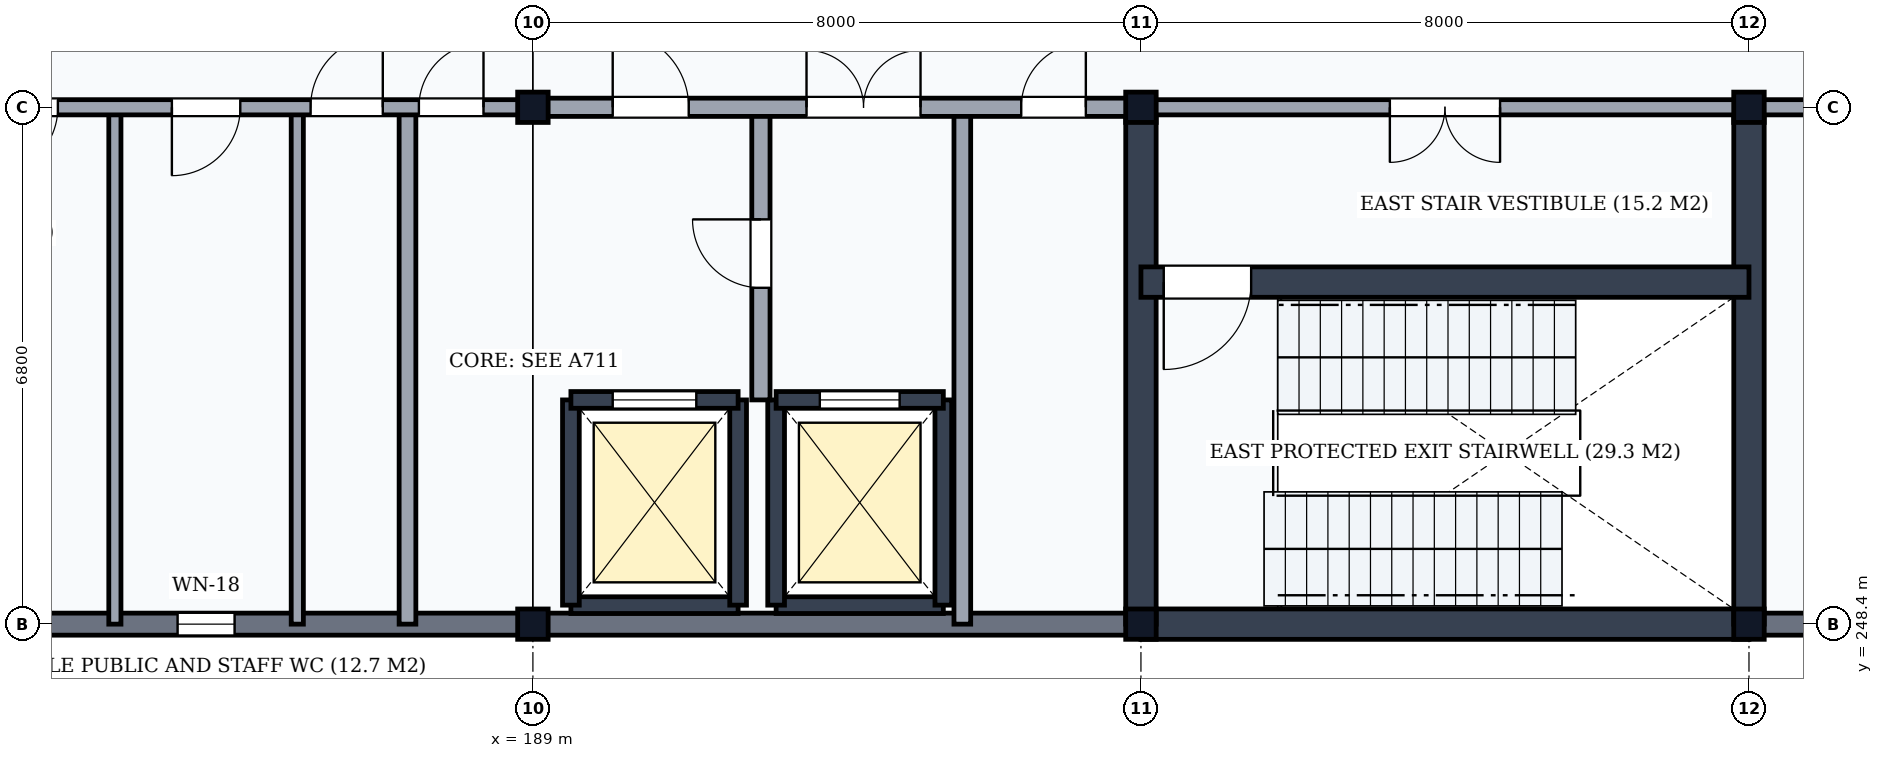
"""IFC4 building model, lengths in metres.
Left out: names, types, materials, properties, quantities, classifications, styles, units other than length and angle.
Written with IfcOpenShell. Run it as: python <this file> out.ifc"""

import sys

from ifc_helpers import new_model, si_unit, direction, frame, frame_2d, origin, origin_2d, place, context, subcontext, project, spatial, rectangle, i_section, extrude, element, fill, save


model = new_model("IFC4")
c1 = context("Model", 3, precision=1e-05, world=origin(), true_north=direction((0.0, 1.0)))
c2 = subcontext(c1, "Body", "Model", "MODEL_VIEW")
j1 = project(units=[si_unit("LENGTHUNIT", "METRE"), si_unit("PLANEANGLEUNIT", "RADIAN")], contexts=[c1])
p1 = place(None, origin())
s1 = spatial("IfcSite", under=j1, at=p1, CompositionType="ELEMENT")
p2 = place(p1, origin())
s2 = spatial("IfcBuilding", under=s1, at=p2, CompositionType="ELEMENT")
p3 = place(p2, frame((0.0, 0.0, 10.5)))
s3 = spatial("IfcBuildingStorey", under=s2, at=p3, CompositionType="ELEMENT", Elevation=10.5)
for number, where, z_axis, x_axis in (
    (1, (189.0, 248.4, 0.0), (0.0, 0.0, 1.0), (1.0, 0.0, 0.0)),
    (2, (189.0, 255.2, 0.0), (0.0, 0.0, 1.0), (1.0, 0.0, 0.0)),
    (3, (197.0, 248.4, 0.0), (0.0, 0.0, 1.0), (1.0, 0.0, 0.0)),
    (4, (197.0, 255.2, 0.0), (0.0, 0.0, 1.0), (1.0, 0.0, 0.0)),
    (5, (205.0, 248.4, 0.0), (0.0, 0.0, 1.0), (1.0, 0.0, 0.0)),
    (6, (205.0, 255.2, 0.0), (0.0, 0.0, 1.0), (1.0, 0.0, 0.0)),
):
    element("IfcColumn", number, at=place(p3, frame(where, z_axis=z_axis, x_axis=x_axis)), inside=s3, PredefinedType="COLUMN", context=c2, shape_type="SweptSolid", body=[
        extrude(i_section(OverallWidth=0.401, OverallDepth=0.399, WebThickness=0.025, FlangeThickness=0.04, FilletRadius=0.015, at=origin_2d()), origin(), (0.0, 0.0, 1.0), 5.1),
    ])
p4 = place(p3, frame((181.006, 248.4, 0.0), z_axis=(0.0, 0.0, 1.0), x_axis=(1.0, 0.0, 0.0)))
e7 = element("IfcWall", 7, at=p4, inside=s3, PredefinedType="SOLIDWALL", context=c2, shape_type="SweptSolid", body=[
    extrude(rectangle(XDim=7.988, YDim=0.29, at=frame_2d((3.994, 0.0))), origin(), (0.0, 0.0, 1.0), 4.528),
])
p5 = place(p4, frame((3.319, 0.0, 0.85)))
e8 = element("IfcOpeningElement", 8, at=p5, cuts=e7, PredefinedType="OPENING", context=c2, shape_type="SweptSolid", body=[
    extrude(rectangle(XDim=0.75, YDim=2.0, at=frame_2d((0.375, 1.0))), frame((0.0, 0.16, 0.0), z_axis=(0.0, -1.0, 0.0), x_axis=(1.0, 0.0, 0.0)), (0.0, 0.0, 1.0), 0.32),
])
p6 = place(p3, frame((189.006, 248.4, 0.0), z_axis=(0.0, 0.0, 1.0), x_axis=(1.0, 0.0, 0.0)))
e9 = element("IfcWall", 9, at=p6, inside=s3, PredefinedType="SOLIDWALL", context=c2, shape_type="SweptSolid", body=[
    extrude(rectangle(XDim=7.988, YDim=0.29, at=frame_2d((3.994, 0.0))), origin(), (0.0, 0.0, 1.0), 4.528),
])
p7 = place(p3, frame((205.006, 248.4, 0.0), z_axis=(0.0, 0.0, 1.0), x_axis=(1.0, 0.0, 0.0)))
e10 = element("IfcWall", 10, at=p7, inside=s3, PredefinedType="SOLIDWALL", context=c2, shape_type="SweptSolid", body=[
    extrude(rectangle(XDim=7.988, YDim=0.29, at=frame_2d((3.994, 0.0))), origin(), (0.0, 0.0, 1.0), 4.528),
])
p8 = place(p7, frame((3.319, 0.0, 0.95)))
e11 = element("IfcOpeningElement", 11, at=p8, cuts=e10, PredefinedType="OPENING", context=c2, shape_type="SweptSolid", body=[
    extrude(rectangle(XDim=1.35, YDim=1.8, at=frame_2d((0.675, 0.9))), frame((0.0, 0.16, 0.0), z_axis=(0.0, -1.0, 0.0), x_axis=(1.0, 0.0, 0.0)), (0.0, 0.0, 1.0), 0.32),
])
p9 = place(p3, frame((197.0, 248.4, 0.0), z_axis=(0.0, 0.0, 1.0), x_axis=(1.0, 0.0, 0.0)))
e12 = element("IfcWall", 12, at=p9, inside=s3, PredefinedType="SHEAR", context=c2, shape_type="SweptSolid", body=[
    extrude(rectangle(XDim=8.0, YDim=0.4, at=frame_2d((4.0, 0.0))), origin(), (0.0, 0.0, 1.0), 4.84),
])
for number, where, z_axis, x_axis in (
    (13, (197.0, 248.4, 0.0), (0.0, 0.0, 1.0), (0.0, 1.0, 0.0)),
    (14, (205.0, 248.4, 0.0), (0.0, 0.0, 1.0), (0.0, 1.0, 0.0)),
):
    element("IfcWall", number, at=place(p3, frame(where, z_axis=z_axis, x_axis=x_axis)), inside=s3, PredefinedType="SHEAR", context=c2, shape_type="SweptSolid", body=[
        extrude(rectangle(XDim=6.8, YDim=0.4, at=frame_2d((3.4, 0.0))), origin(), (0.0, 0.0, 1.0), 4.84),
    ])
p10 = place(p3, frame((197.0, 252.9, 0.0), z_axis=(0.0, 0.0, 1.0), x_axis=(1.0, 0.0, 0.0)))
e15 = element("IfcWall", 15, at=p10, inside=s3, PredefinedType="SHEAR", context=c2, shape_type="SweptSolid", body=[
    extrude(rectangle(XDim=8.0, YDim=0.4, at=frame_2d((4.0, 0.0))), origin(), (0.0, 0.0, 1.0), 4.84),
])
p11 = place(p10, frame((0.3, 0.0, 0.0)))
e16 = element("IfcOpeningElement", 16, at=p11, cuts=e15, PredefinedType="OPENING", context=c2, shape_type="SweptSolid", body=[
    extrude(rectangle(XDim=1.15, YDim=2.15, at=frame_2d((0.575, 1.075))), frame((0.0, 0.215, 0.0), z_axis=(0.0, -1.0, 0.0), x_axis=(1.0, 0.0, 0.0)), (0.0, 0.0, 1.0), 0.43),
])
p12 = place(p3, frame((197.0, 255.2, 0.0), z_axis=(0.0, 0.0, 1.0), x_axis=(1.0, 0.0, 0.0)))
e17 = element("IfcWall", 17, at=p12, inside=s3, PredefinedType="PARTITIONING", context=c2, shape_type="SweptSolid", body=[
    extrude(rectangle(XDim=8.0, YDim=0.2, at=frame_2d((4.0, 0.0))), origin(), (0.0, 0.0, 1.0), 4.338),
])
p13 = place(p12, frame((3.275, 0.0, 0.0)))
e18 = element("IfcOpeningElement", 18, at=p13, cuts=e17, PredefinedType="OPENING", context=c2, shape_type="SweptSolid", body=[
    extrude(rectangle(XDim=1.45, YDim=2.2, at=frame_2d((0.725, 1.1))), frame((0.0, 0.115, 0.0), z_axis=(0.0, -1.0, 0.0), x_axis=(1.0, 0.0, 0.0)), (0.0, 0.0, 1.0), 0.23),
])
p14 = place(p3, frame((189.5, 248.65, 0.0), z_axis=(0.0, 0.0, 1.0), x_axis=(1.0, 0.0, 0.0)))
e19 = element("IfcWall", 19, at=p14, inside=s3, PredefinedType="SHEAR", context=c2, shape_type="SweptSolid", body=[
    extrude(rectangle(XDim=2.2, YDim=0.22, at=frame_2d((1.1, 0.0))), origin(), (0.0, 0.0, 1.0), 4.84),
])
for number, where, z_axis, x_axis in (
    (20, (189.5, 248.65, 0.0), (0.0, 0.0, 1.0), (0.0, 1.0, 0.0)),
    (21, (191.7, 248.65, 0.0), (0.0, 0.0, 1.0), (0.0, 1.0, 0.0)),
):
    element("IfcWall", number, at=place(p3, frame(where, z_axis=z_axis, x_axis=x_axis)), inside=s3, PredefinedType="SHEAR", context=c2, shape_type="SweptSolid", body=[
        extrude(rectangle(XDim=2.7, YDim=0.22, at=frame_2d((1.35, 0.0))), origin(), (0.0, 0.0, 1.0), 4.84),
    ])
p15 = place(p3, frame((189.5, 251.35, 0.0), z_axis=(0.0, 0.0, 1.0), x_axis=(1.0, 0.0, 0.0)))
e22 = element("IfcWall", 22, at=p15, inside=s3, PredefinedType="SHEAR", context=c2, shape_type="SweptSolid", body=[
    extrude(rectangle(XDim=2.2, YDim=0.22, at=frame_2d((1.1, 0.0))), origin(), (0.0, 0.0, 1.0), 4.84),
])
p16 = place(p15, frame((0.55, 0.0, 0.0)))
e23 = element("IfcOpeningElement", 23, at=p16, cuts=e22, PredefinedType="OPENING", context=c2, shape_type="SweptSolid", body=[
    extrude(rectangle(XDim=1.1, YDim=2.15, at=frame_2d((0.55, 1.075))), frame((0.0, 0.125, 0.0), z_axis=(0.0, -1.0, 0.0), x_axis=(1.0, 0.0, 0.0)), (0.0, 0.0, 1.0), 0.25),
])
p17 = place(p3, frame((192.2, 248.65, 0.0), z_axis=(0.0, 0.0, 1.0), x_axis=(1.0, 0.0, 0.0)))
e24 = element("IfcWall", 24, at=p17, inside=s3, PredefinedType="SHEAR", context=c2, shape_type="SweptSolid", body=[
    extrude(rectangle(XDim=2.2, YDim=0.22, at=frame_2d((1.1, 0.0))), origin(), (0.0, 0.0, 1.0), 4.84),
])
for number, where, z_axis, x_axis in (
    (25, (192.2, 248.65, 0.0), (0.0, 0.0, 1.0), (0.0, 1.0, 0.0)),
    (26, (194.4, 248.65, 0.0), (0.0, 0.0, 1.0), (0.0, 1.0, 0.0)),
):
    element("IfcWall", number, at=place(p3, frame(where, z_axis=z_axis, x_axis=x_axis)), inside=s3, PredefinedType="SHEAR", context=c2, shape_type="SweptSolid", body=[
        extrude(rectangle(XDim=2.7, YDim=0.22, at=frame_2d((1.35, 0.0))), origin(), (0.0, 0.0, 1.0), 4.84),
    ])
p18 = place(p3, frame((192.2, 251.35, 0.0), z_axis=(0.0, 0.0, 1.0), x_axis=(1.0, 0.0, 0.0)))
e27 = element("IfcWall", 27, at=p18, inside=s3, PredefinedType="SHEAR", context=c2, shape_type="SweptSolid", body=[
    extrude(rectangle(XDim=2.2, YDim=0.22, at=frame_2d((1.1, 0.0))), origin(), (0.0, 0.0, 1.0), 4.84),
])
p19 = place(p18, frame((0.575, 0.0, 0.0)))
e28 = element("IfcOpeningElement", 28, at=p19, cuts=e27, PredefinedType="OPENING", context=c2, shape_type="SweptSolid", body=[
    extrude(rectangle(XDim=1.05, YDim=2.15, at=frame_2d((0.525, 1.075))), frame((0.0, 0.125, 0.0), z_axis=(0.0, -1.0, 0.0), x_axis=(1.0, 0.0, 0.0)), (0.0, 0.0, 1.0), 0.25),
])
p20 = place(p3, frame((192.0, 251.35, 0.0), z_axis=(0.0, 0.0, 1.0), x_axis=(0.0, 1.0, 0.0)))
e29 = element("IfcWall", 29, at=p20, inside=s3, PredefinedType="PARTITIONING", context=c2, shape_type="SweptSolid", body=[
    extrude(rectangle(XDim=3.85, YDim=0.24, at=frame_2d((1.925, 0.0))), origin(), (0.0, 0.0, 1.0), 4.84),
])
p21 = place(p20, frame((1.475, 0.0, 0.0)))
e30 = element("IfcOpeningElement", 30, at=p21, cuts=e29, PredefinedType="OPENING", context=c2, shape_type="SweptSolid", body=[
    extrude(rectangle(XDim=0.9, YDim=2.1, at=frame_2d((0.45, 1.05))), frame((0.0, 0.135, 0.0), z_axis=(0.0, -1.0, 0.0), x_axis=(1.0, 0.0, 0.0)), (0.0, 0.0, 1.0), 0.27),
])
p22 = place(p3, frame((194.65, 248.4, 0.0), z_axis=(0.0, 0.0, 1.0), x_axis=(0.0, 1.0, 0.0)))
e31 = element("IfcWall", 31, at=p22, inside=s3, PredefinedType="PARTITIONING", context=c2, shape_type="SweptSolid", body=[
    extrude(rectangle(XDim=6.8, YDim=0.22, at=frame_2d((3.4, 0.0))), origin(), (0.0, 0.0, 1.0), 4.84),
])
for number, where, z_axis, x_axis in (
    (32, (183.5, 248.4, 0.0), (0.0, 0.0, 1.0), (0.0, 1.0, 0.0)),
    (33, (185.9, 248.4, 0.0), (0.0, 0.0, 1.0), (0.0, 1.0, 0.0)),
):
    element("IfcWall", number, at=place(p3, frame(where, z_axis=z_axis, x_axis=x_axis)), inside=s3, PredefinedType="PARTITIONING", context=c2, shape_type="SweptSolid", body=[
        extrude(rectangle(XDim=6.8, YDim=0.16, at=frame_2d((3.4, 0.0))), origin(), (0.0, 0.0, 1.0), 4.84),
    ])
p23 = place(p3, frame((187.35, 248.4, 0.0), z_axis=(0.0, 0.0, 1.0), x_axis=(0.0, 1.0, 0.0)))
e34 = element("IfcWall", 34, at=p23, inside=s3, PredefinedType="PARTITIONING", context=c2, shape_type="SweptSolid", body=[
    extrude(rectangle(XDim=6.8, YDim=0.22, at=frame_2d((3.4, 0.0))), origin(), (0.0, 0.0, 1.0), 4.84),
])
p24 = place(p3, frame((181.0, 255.2, 0.0), z_axis=(0.0, 0.0, 1.0), x_axis=(1.0, 0.0, 0.0)))
e35 = element("IfcWall", 35, at=p24, inside=s3, PredefinedType="PARTITIONING", context=c2, shape_type="SweptSolid", body=[
    extrude(rectangle(XDim=8.0, YDim=0.2, at=frame_2d((4.0, 0.0))), origin(), (0.0, 0.0, 1.0), 4.338),
])
p25 = place(p24, frame((0.85, 0.0, 0.0)))
e36 = element("IfcOpeningElement", 36, at=p25, cuts=e35, PredefinedType="OPENING", context=c2, shape_type="SweptSolid", body=[
    extrude(rectangle(XDim=0.9, YDim=2.1, at=frame_2d((0.45, 1.05))), frame((0.0, 0.115, 0.0), z_axis=(0.0, -1.0, 0.0), x_axis=(1.0, 0.0, 0.0)), (0.0, 0.0, 1.0), 0.23),
])
p26 = place(p24, frame((3.25, 0.0, 0.0)))
e37 = element("IfcOpeningElement", 37, at=p26, cuts=e35, PredefinedType="OPENING", context=c2, shape_type="SweptSolid", body=[
    extrude(rectangle(XDim=0.9, YDim=2.1, at=frame_2d((0.45, 1.05))), frame((0.0, 0.115, 0.0), z_axis=(0.0, -1.0, 0.0), x_axis=(1.0, 0.0, 0.0)), (0.0, 0.0, 1.0), 0.23),
])
p27 = place(p24, frame((5.075, 0.0, 0.0)))
e38 = element("IfcOpeningElement", 38, at=p27, cuts=e35, PredefinedType="OPENING", context=c2, shape_type="SweptSolid", body=[
    extrude(rectangle(XDim=0.95, YDim=2.1, at=frame_2d((0.475, 1.05))), frame((0.0, 0.115, 0.0), z_axis=(0.0, -1.0, 0.0), x_axis=(1.0, 0.0, 0.0)), (0.0, 0.0, 1.0), 0.23),
])
p28 = place(p24, frame((6.5, 0.0, 0.0)))
e39 = element("IfcOpeningElement", 39, at=p28, cuts=e35, PredefinedType="OPENING", context=c2, shape_type="SweptSolid", body=[
    extrude(rectangle(XDim=0.85, YDim=2.1, at=frame_2d((0.425, 1.05))), frame((0.0, 0.115, 0.0), z_axis=(0.0, -1.0, 0.0), x_axis=(1.0, 0.0, 0.0)), (0.0, 0.0, 1.0), 0.23),
])
p29 = place(p3, frame((189.0, 255.2, 0.0), z_axis=(0.0, 0.0, 1.0), x_axis=(1.0, 0.0, 0.0)))
e40 = element("IfcWall", 40, at=p29, inside=s3, PredefinedType="PARTITIONING", context=c2, shape_type="SweptSolid", body=[
    extrude(rectangle(XDim=8.0, YDim=0.24, at=frame_2d((4.0, 0.0))), origin(), (0.0, 0.0, 1.0), 4.338),
])
p30 = place(p29, frame((1.05, 0.0, 0.0)))
e41 = element("IfcOpeningElement", 41, at=p30, cuts=e40, PredefinedType="OPENING", context=c2, shape_type="SweptSolid", body=[
    extrude(rectangle(XDim=1.0, YDim=2.1, at=frame_2d((0.5, 1.05))), frame((0.0, 0.135, 0.0), z_axis=(0.0, -1.0, 0.0), x_axis=(1.0, 0.0, 0.0)), (0.0, 0.0, 1.0), 0.27),
])
p31 = place(p29, frame((3.6, 0.0, 0.0)))
e42 = element("IfcOpeningElement", 42, at=p31, cuts=e40, PredefinedType="OPENING", context=c2, shape_type="SweptSolid", body=[
    extrude(rectangle(XDim=1.5, YDim=2.25, at=frame_2d((0.75, 1.125))), frame((0.0, 0.135, 0.0), z_axis=(0.0, -1.0, 0.0), x_axis=(1.0, 0.0, 0.0)), (0.0, 0.0, 1.0), 0.27),
])
p32 = place(p29, frame((6.425, 0.0, 0.0)))
e43 = element("IfcOpeningElement", 43, at=p32, cuts=e40, PredefinedType="OPENING", context=c2, shape_type="SweptSolid", body=[
    extrude(rectangle(XDim=0.85, YDim=2.1, at=frame_2d((0.425, 1.05))), frame((0.0, 0.135, 0.0), z_axis=(0.0, -1.0, 0.0), x_axis=(1.0, 0.0, 0.0)), (0.0, 0.0, 1.0), 0.27),
])
p33 = place(p3, frame((205.0, 255.2, 0.0), z_axis=(0.0, 0.0, 1.0), x_axis=(1.0, 0.0, 0.0)))
e44 = element("IfcWall", 44, at=p33, inside=s3, PredefinedType="PARTITIONING", context=c2, shape_type="SweptSolid", body=[
    extrude(rectangle(XDim=24.0, YDim=0.2, at=frame_2d((12.0, 0.0))), origin(), (0.0, 0.0, 1.0), 4.338),
])
p34 = place(p33, frame((5.5, 0.0, 0.0)))
e45 = element("IfcOpeningElement", 45, at=p34, cuts=e44, PredefinedType="OPENING", context=c2, shape_type="SweptSolid", body=[
    extrude(rectangle(XDim=1.0, YDim=2.1, at=frame_2d((0.5, 1.05))), frame((0.0, 0.115, 0.0), z_axis=(0.0, -1.0, 0.0), x_axis=(1.0, 0.0, 0.0)), (0.0, 0.0, 1.0), 0.23),
])
p35 = place(p33, frame((17.5, 0.0, 0.0)))
e46 = element("IfcOpeningElement", 46, at=p35, cuts=e44, PredefinedType="OPENING", context=c2, shape_type="SweptSolid", body=[
    extrude(rectangle(XDim=1.0, YDim=2.1, at=frame_2d((0.5, 1.05))), frame((0.0, 0.115, 0.0), z_axis=(0.0, -1.0, 0.0), x_axis=(1.0, 0.0, 0.0)), (0.0, 0.0, 1.0), 0.23),
])
p36 = place(p5, origin())
e47 = element("IfcWindow", 47, at=p36, inside=s3, PartitioningType="SINGLE_PANEL", PredefinedType="WINDOW", context=c2, shape_type="SweptSolid", body=[
    extrude(rectangle(XDim=0.75, YDim=2.0, at=frame_2d((0.375, 1.0))), frame((0.0, 0.03, 0.0), z_axis=(0.0, -1.0, 0.0), x_axis=(1.0, 0.0, 0.0)), (0.0, 0.0, 1.0), 0.06),
])
fill(e8, e47)
p37 = place(p11, frame((1.15, 0.0, 0.0), z_axis=(0.0, 0.0, 1.0), x_axis=(-1.0, 0.0, 0.0)))
e48 = element("IfcDoor", 48, at=p37, inside=s3, OperationType="SINGLE_SWING_RIGHT", PredefinedType="DOOR", context=c2, shape_type="SweptSolid", body=[
    extrude(rectangle(XDim=1.15, YDim=2.15, at=frame_2d((0.575, 1.075))), frame((0.0, 0.025, 0.0), z_axis=(0.0, -1.0, 0.0), x_axis=(1.0, 0.0, 0.0)), (0.0, 0.0, 1.0), 0.05),
])
fill(e16, e48)
p38 = place(p13, frame((1.45, 0.0, 0.0), z_axis=(0.0, 0.0, 1.0), x_axis=(-1.0, 0.0, 0.0)))
e49 = element("IfcDoor", 49, at=p38, inside=s3, OperationType="DOUBLE_DOOR_SINGLE_SWING", PredefinedType="DOOR", context=c2, shape_type="SweptSolid", body=[
    extrude(rectangle(XDim=1.45, YDim=2.2, at=frame_2d((0.725, 1.1))), frame((0.0, 0.025, 0.0), z_axis=(0.0, -1.0, 0.0), x_axis=(1.0, 0.0, 0.0)), (0.0, 0.0, 1.0), 0.05),
])
fill(e18, e49)
p39 = place(p16, origin())
e50 = element("IfcDoor", 50, at=p39, inside=s3, OperationType="DOUBLE_DOOR_SLIDING", PredefinedType="USERDEFINED", context=c2, shape_type="SweptSolid", body=[
    extrude(rectangle(XDim=1.1, YDim=2.15, at=frame_2d((0.55, 1.075))), frame((0.0, 0.025, 0.0), z_axis=(0.0, -1.0, 0.0), x_axis=(1.0, 0.0, 0.0)), (0.0, 0.0, 1.0), 0.05),
])
fill(e23, e50)
p40 = place(p19, origin())
e51 = element("IfcDoor", 51, at=p40, inside=s3, OperationType="DOUBLE_DOOR_SLIDING", PredefinedType="USERDEFINED", context=c2, shape_type="SweptSolid", body=[
    extrude(rectangle(XDim=1.05, YDim=2.15, at=frame_2d((0.525, 1.075))), frame((0.0, 0.025, 0.0), z_axis=(0.0, -1.0, 0.0), x_axis=(1.0, 0.0, 0.0)), (0.0, 0.0, 1.0), 0.05),
])
fill(e28, e51)
p41 = place(p21, frame((0.9, 0.0, 0.0), z_axis=(0.0, 0.0, 1.0), x_axis=(-1.0, 0.0, 0.0)))
e52 = element("IfcDoor", 52, at=p41, inside=s3, OperationType="SINGLE_SWING_LEFT", PredefinedType="DOOR", context=c2, shape_type="SweptSolid", body=[
    extrude(rectangle(XDim=0.9, YDim=2.1, at=frame_2d((0.45, 1.05))), frame((0.0, 0.025, 0.0), z_axis=(0.0, -1.0, 0.0), x_axis=(1.0, 0.0, 0.0)), (0.0, 0.0, 1.0), 0.05),
])
fill(e30, e52)
p42 = place(p25, frame((0.9, 0.0, 0.0), z_axis=(0.0, 0.0, 1.0), x_axis=(-1.0, 0.0, 0.0)))
e53 = element("IfcDoor", 53, at=p42, inside=s3, OperationType="SINGLE_SWING_RIGHT", PredefinedType="DOOR", context=c2, shape_type="SweptSolid", body=[
    extrude(rectangle(XDim=0.9, YDim=2.1, at=frame_2d((0.45, 1.05))), frame((0.0, 0.025, 0.0), z_axis=(0.0, -1.0, 0.0), x_axis=(1.0, 0.0, 0.0)), (0.0, 0.0, 1.0), 0.05),
])
fill(e36, e53)
p43 = place(p26, frame((0.9, 0.0, 0.0), z_axis=(0.0, 0.0, 1.0), x_axis=(-1.0, 0.0, 0.0)))
e54 = element("IfcDoor", 54, at=p43, inside=s3, OperationType="SINGLE_SWING_RIGHT", PredefinedType="DOOR", context=c2, shape_type="SweptSolid", body=[
    extrude(rectangle(XDim=0.9, YDim=2.1, at=frame_2d((0.45, 1.05))), frame((0.0, 0.025, 0.0), z_axis=(0.0, -1.0, 0.0), x_axis=(1.0, 0.0, 0.0)), (0.0, 0.0, 1.0), 0.05),
])
fill(e37, e54)
p44 = place(p27, frame((0.95, 0.0, 0.0), z_axis=(0.0, 0.0, 1.0), x_axis=(-1.0, 0.0, 0.0)))
e55 = element("IfcDoor", 55, at=p44, inside=s3, OperationType="SINGLE_SWING_LEFT", PredefinedType="DOOR", context=c2, shape_type="SweptSolid", body=[
    extrude(rectangle(XDim=0.95, YDim=2.1, at=frame_2d((0.475, 1.05))), frame((0.0, 0.025, 0.0), z_axis=(0.0, -1.0, 0.0), x_axis=(1.0, 0.0, 0.0)), (0.0, 0.0, 1.0), 0.05),
])
fill(e38, e55)
p45 = place(p28, frame((0.85, 0.0, 0.0), z_axis=(0.0, 0.0, 1.0), x_axis=(-1.0, 0.0, 0.0)))
e56 = element("IfcDoor", 56, at=p45, inside=s3, OperationType="SINGLE_SWING_LEFT", PredefinedType="DOOR", context=c2, shape_type="SweptSolid", body=[
    extrude(rectangle(XDim=0.85, YDim=2.1, at=frame_2d((0.425, 1.05))), frame((0.0, 0.025, 0.0), z_axis=(0.0, -1.0, 0.0), x_axis=(1.0, 0.0, 0.0)), (0.0, 0.0, 1.0), 0.05),
])
fill(e39, e56)
p46 = place(p30, origin())
e57 = element("IfcDoor", 57, at=p46, inside=s3, OperationType="SINGLE_SWING_LEFT", PredefinedType="DOOR", context=c2, shape_type="SweptSolid", body=[
    extrude(rectangle(XDim=1.0, YDim=2.1, at=frame_2d((0.5, 1.05))), frame((0.0, 0.025, 0.0), z_axis=(0.0, -1.0, 0.0), x_axis=(1.0, 0.0, 0.0)), (0.0, 0.0, 1.0), 0.05),
])
fill(e41, e57)
p47 = place(p31, origin())
e58 = element("IfcDoor", 58, at=p47, inside=s3, OperationType="DOUBLE_DOOR_SINGLE_SWING", PredefinedType="DOOR", context=c2, shape_type="SweptSolid", body=[
    extrude(rectangle(XDim=1.5, YDim=2.25, at=frame_2d((0.75, 1.125))), frame((0.0, 0.025, 0.0), z_axis=(0.0, -1.0, 0.0), x_axis=(1.0, 0.0, 0.0)), (0.0, 0.0, 1.0), 0.05),
])
fill(e42, e58)
p48 = place(p32, frame((0.85, 0.0, 0.0), z_axis=(0.0, 0.0, 1.0), x_axis=(-1.0, 0.0, 0.0)))
e59 = element("IfcDoor", 59, at=p48, inside=s3, OperationType="SINGLE_SWING_LEFT", PredefinedType="DOOR", context=c2, shape_type="SweptSolid", body=[
    extrude(rectangle(XDim=0.85, YDim=2.1, at=frame_2d((0.425, 1.05))), frame((0.0, 0.025, 0.0), z_axis=(0.0, -1.0, 0.0), x_axis=(1.0, 0.0, 0.0)), (0.0, 0.0, 1.0), 0.05),
])
fill(e43, e59)
save(model, sys.argv[1])
